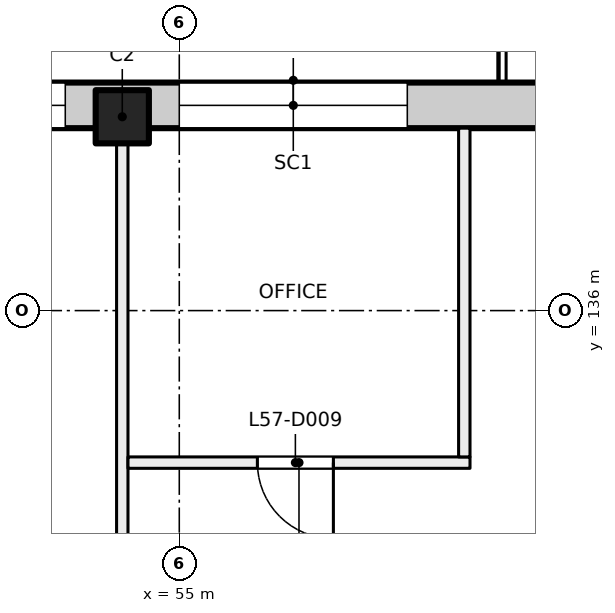
"""IFC4 building model, lengths in metres.
Left out: names, types, materials, properties, quantities, classifications, styles, units other than length and angle.
Written with IfcOpenShell. Run it as: python <this file> out.ifc"""

import sys

from ifc_helpers import new_model, si_unit, direction, frame, frame_2d, origin, origin_2d, place, context, subcontext, project, spatial, rectangle, extrude, element, fill, save


model = new_model("IFC4")
c1 = context("Model", 3, precision=1e-05, world=origin(), true_north=direction((0.0, 1.0)))
c2 = subcontext(c1, "Body", "Model", "MODEL_VIEW")
j1 = project(units=[si_unit("LENGTHUNIT", "METRE"), si_unit("PLANEANGLEUNIT", "RADIAN")], contexts=[c1])
p1 = place(None, origin())
s1 = spatial("IfcSite", under=j1, at=p1, CompositionType="ELEMENT")
p2 = place(p1, origin())
s2 = spatial("IfcBuilding", under=s1, at=p2, CompositionType="ELEMENT")
p3 = place(p2, frame((0.0, 0.0, 241.5)))
s3 = spatial("IfcBuildingStorey", under=s2, at=p3, CompositionType="ELEMENT", Elevation=241.5)
p4 = place(p3, frame((54.25, 138.55, 0.0), z_axis=(0.0, 0.0, 1.0), x_axis=(1.0, 0.0, 0.0)))
e1 = element("IfcColumn", 1, at=p4, inside=s3, PredefinedType="COLUMN", context=c2, shape_type="SweptSolid", body=[
    extrude(rectangle(XDim=0.7, YDim=0.7, at=origin_2d()), origin(), (0.0, 0.0, 1.0), 4.0),
])
p5 = place(p3, frame((47.07, 138.7, 0.0), z_axis=(0.0, 0.0, 1.0), x_axis=(1.0, 0.0, 0.0)))
e2 = element("IfcWall", 2, at=p5, inside=s3, PredefinedType="SOLIDWALL", context=c2, shape_type="SweptSolid", body=[
    extrude(rectangle(XDim=43.91, YDim=0.6, at=frame_2d((21.955, 0.0))), origin(), (0.0, 0.0, 1.0), 3.625),
])
p6 = place(p5, frame((3.43, 0.0, 0.9)))
e3 = element("IfcOpeningElement", 3, at=p6, cuts=e2, PredefinedType="OPENING", context=c2, shape_type="SweptSolid", body=[
    extrude(rectangle(XDim=3.0, YDim=2.4, at=frame_2d((1.5, 1.2))), frame((0.0, 0.31, 0.0), z_axis=(0.0, -1.0, 0.0), x_axis=(1.0, 0.0, 0.0)), (0.0, 0.0, 1.0), 0.62),
])
p7 = place(p5, frame((7.93, 0.0, 0.9)))
e4 = element("IfcOpeningElement", 4, at=p7, cuts=e2, PredefinedType="OPENING", context=c2, shape_type="SweptSolid", body=[
    extrude(rectangle(XDim=3.0, YDim=2.4, at=frame_2d((1.5, 1.2))), frame((0.0, 0.31, 0.0), z_axis=(0.0, -1.0, 0.0), x_axis=(1.0, 0.0, 0.0)), (0.0, 0.0, 1.0), 0.62),
])
p8 = place(p5, frame((13.03, 0.0, 0.0)))
e5 = element("IfcOpeningElement", 5, at=p8, cuts=e2, PredefinedType="OPENING", context=c2, shape_type="SweptSolid", body=[
    extrude(rectangle(XDim=1.8, YDim=2.4, at=frame_2d((0.9, 1.2))), frame((0.0, 0.31, 0.0), z_axis=(0.0, -1.0, 0.0), x_axis=(1.0, 0.0, 0.0)), (0.0, 0.0, 1.0), 0.62),
])
p9 = place(p5, frame((16.93, 0.0, 0.9)))
e6 = element("IfcOpeningElement", 6, at=p9, cuts=e2, PredefinedType="OPENING", context=c2, shape_type="SweptSolid", body=[
    extrude(rectangle(XDim=3.0, YDim=2.4, at=frame_2d((1.5, 1.2))), frame((0.0, 0.31, 0.0), z_axis=(0.0, -1.0, 0.0), x_axis=(1.0, 0.0, 0.0)), (0.0, 0.0, 1.0), 0.62),
])
p10 = place(p5, frame((21.43, 0.0, 0.9)))
e7 = element("IfcOpeningElement", 7, at=p10, cuts=e2, PredefinedType="OPENING", context=c2, shape_type="SweptSolid", body=[
    extrude(rectangle(XDim=3.0, YDim=2.4, at=frame_2d((1.5, 1.2))), frame((0.0, 0.31, 0.0), z_axis=(0.0, -1.0, 0.0), x_axis=(1.0, 0.0, 0.0)), (0.0, 0.0, 1.0), 0.62),
])
p11 = place(p5, frame((25.93, 0.0, 0.9)))
e8 = element("IfcOpeningElement", 8, at=p11, cuts=e2, PredefinedType="OPENING", context=c2, shape_type="SweptSolid", body=[
    extrude(rectangle(XDim=3.0, YDim=2.4, at=frame_2d((1.5, 1.2))), frame((0.0, 0.31, 0.0), z_axis=(0.0, -1.0, 0.0), x_axis=(1.0, 0.0, 0.0)), (0.0, 0.0, 1.0), 0.62),
])
p12 = place(p5, frame((30.43, 0.0, 0.9)))
e9 = element("IfcOpeningElement", 9, at=p12, cuts=e2, PredefinedType="OPENING", context=c2, shape_type="SweptSolid", body=[
    extrude(rectangle(XDim=3.0, YDim=2.4, at=frame_2d((1.5, 1.2))), frame((0.0, 0.31, 0.0), z_axis=(0.0, -1.0, 0.0), x_axis=(1.0, 0.0, 0.0)), (0.0, 0.0, 1.0), 0.62),
])
p13 = place(p5, frame((34.93, 0.0, 0.9)))
e10 = element("IfcOpeningElement", 10, at=p13, cuts=e2, PredefinedType="OPENING", context=c2, shape_type="SweptSolid", body=[
    extrude(rectangle(XDim=3.0, YDim=2.4, at=frame_2d((1.5, 1.2))), frame((0.0, 0.31, 0.0), z_axis=(0.0, -1.0, 0.0), x_axis=(1.0, 0.0, 0.0)), (0.0, 0.0, 1.0), 0.62),
])
p14 = place(p5, frame((39.43, 0.0, 0.9)))
e11 = element("IfcOpeningElement", 11, at=p14, cuts=e2, PredefinedType="OPENING", context=c2, shape_type="SweptSolid", body=[
    extrude(rectangle(XDim=3.0, YDim=2.4, at=frame_2d((1.5, 1.2))), frame((0.0, 0.31, 0.0), z_axis=(0.0, -1.0, 0.0), x_axis=(1.0, 0.0, 0.0)), (0.0, 0.0, 1.0), 0.62),
])
p15 = place(p3, frame((54.25, 121.35, 0.0), z_axis=(0.0, 0.0, 1.0), x_axis=(0.0, 1.0, 0.0)))
e12 = element("IfcWall", 12, at=p15, inside=s3, PredefinedType="PARTITIONING", context=c2, shape_type="SweptSolid", body=[
    extrude(rectangle(XDim=17.05, YDim=0.15, at=frame_2d((8.525, 0.0))), origin(), (0.0, 0.0, 1.0), 3.625),
])
p16 = place(p3, frame((58.825, 134.0, 0.0), z_axis=(0.0, 0.0, 1.0), x_axis=(-1.0, 0.0, 0.0)))
e13 = element("IfcWall", 13, at=p16, inside=s3, PredefinedType="PARTITIONING", context=c2, shape_type="SweptSolid", body=[
    extrude(rectangle(XDim=4.5, YDim=0.15, at=frame_2d((2.25, 0.0))), origin(), (0.0, 0.0, 1.0), 3.625),
])
p17 = place(p16, frame((1.798, 0.0, 0.0)))
e14 = element("IfcOpeningElement", 14, at=p17, cuts=e13, PredefinedType="OPENING", context=c2, shape_type="SweptSolid", body=[
    extrude(rectangle(XDim=1.0, YDim=2.1, at=frame_2d((0.5, 1.05))), frame((0.0, 0.085, 0.0), z_axis=(0.0, -1.0, 0.0), x_axis=(1.0, 0.0, 0.0)), (0.0, 0.0, 1.0), 0.17),
])
p18 = place(p3, frame((58.75, 138.4, 0.0), z_axis=(0.0, 0.0, 1.0), x_axis=(0.0, -1.0, 0.0)))
e15 = element("IfcWall", 15, at=p18, inside=s3, PredefinedType="PARTITIONING", context=c2, shape_type="SweptSolid", body=[
    extrude(rectangle(XDim=4.325, YDim=0.15, at=frame_2d((2.163, 0.0))), origin(), (0.0, 0.0, 1.0), 3.625),
])
p19 = place(p6, origin())
e16 = element("IfcWindow", 16, at=p19, inside=s3, PartitioningType="SINGLE_PANEL", PredefinedType="WINDOW", context=c2, shape_type="SweptSolid", body=[
    extrude(rectangle(XDim=3.0, YDim=2.4, at=frame_2d((1.5, 1.2))), frame((0.0, 0.03, 0.0), z_axis=(0.0, -1.0, 0.0), x_axis=(1.0, 0.0, 0.0)), (0.0, 0.0, 1.0), 0.06),
])
fill(e3, e16)
p20 = place(p7, origin())
e17 = element("IfcWindow", 17, at=p20, inside=s3, PartitioningType="SINGLE_PANEL", PredefinedType="WINDOW", context=c2, shape_type="SweptSolid", body=[
    extrude(rectangle(XDim=3.0, YDim=2.4, at=frame_2d((1.5, 1.2))), frame((0.0, 0.03, 0.0), z_axis=(0.0, -1.0, 0.0), x_axis=(1.0, 0.0, 0.0)), (0.0, 0.0, 1.0), 0.06),
])
fill(e4, e17)
p21 = place(p17, origin())
e18 = element("IfcDoor", 18, at=p21, inside=s3, OperationType="SINGLE_SWING_LEFT", PredefinedType="DOOR", context=c2, shape_type="SweptSolid", body=[
    extrude(rectangle(XDim=1.0, YDim=2.1, at=frame_2d((0.5, 1.05))), frame((0.0, 0.025, 0.0), z_axis=(0.0, -1.0, 0.0), x_axis=(1.0, 0.0, 0.0)), (0.0, 0.0, 1.0), 0.05),
])
fill(e14, e18)
save(model, sys.argv[1])
